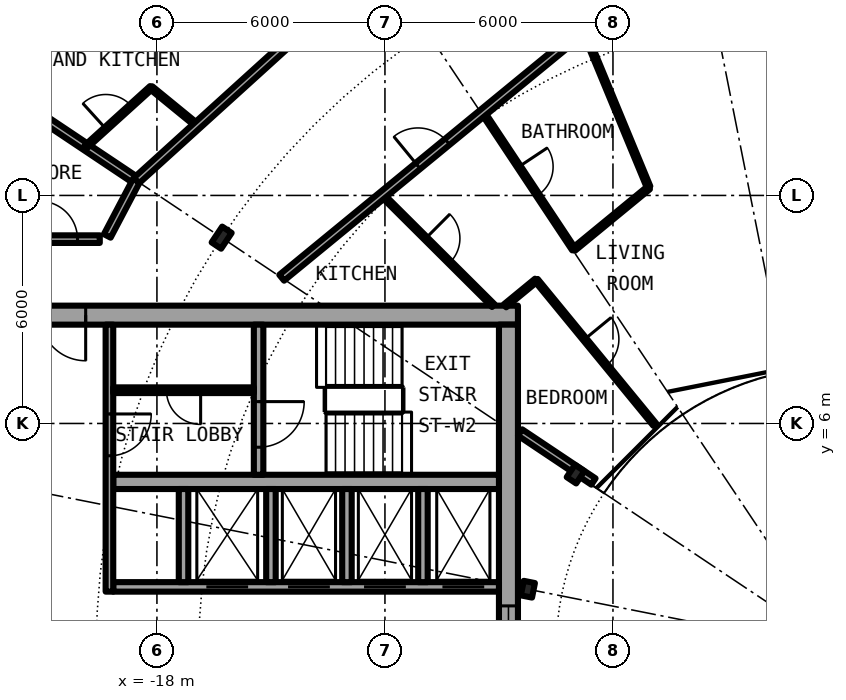
"""IFC4 building model, lengths in metres.
Left out: names, types, materials, properties, quantities, classifications, styles, units other than length and angle.
Written with IfcOpenShell. Run it as: python <this file> out.ifc"""

import sys

from ifc_helpers import new_model, si_unit, direction, frame, frame_2d, origin, origin_2d, place, context, subcontext, project, spatial, rectangle, i_section, extrude, element, fill, save


model = new_model("IFC4")
c1 = context("Model", 3, precision=1e-05, world=origin(), true_north=direction((0.0, 1.0)))
c2 = subcontext(c1, "Body", "Model", "MODEL_VIEW")
j1 = project(units=[si_unit("LENGTHUNIT", "METRE"), si_unit("PLANEANGLEUNIT", "RADIAN")], contexts=[c1])
p1 = place(None, origin())
s1 = spatial("IfcSite", under=j1, at=p1, CompositionType="ELEMENT")
p2 = place(p1, origin())
s2 = spatial("IfcBuilding", under=s1, at=p2, CompositionType="ELEMENT")
p3 = place(p2, frame((0.0, 0.0, 161.6)))
s3 = spatial("IfcBuildingStorey", under=s2, at=p3, CompositionType="ELEMENT", Elevation=161.6)
p4 = place(p3, frame((-16.297, 10.889, 0.0), z_axis=(0.0, 0.0, 1.0), x_axis=(-0.831469612303, 0.55557023302, 0.0)))
e1 = element("IfcColumn", 1, at=p4, inside=s3, PredefinedType="COLUMN", context=c2, shape_type="SweptSolid", body=[
    extrude(i_section(OverallWidth=0.3, OverallDepth=0.5, WebThickness=0.014, FlangeThickness=0.028, FilletRadius=0.027, at=origin_2d()), origin(), (0.0, 0.0, 1.0), 3.05),
])
for number, where, z_axis, x_axis in (
    (2, (-6.984, 4.667, 0.0), (0.0, 0.0, 1.0), (-0.831, 0.556, 0.0)),
    (3, (-8.239, 1.639, 0.0), (0.0, 0.0, 1.0), (-0.981, 0.195, 0.0)),
):
    element("IfcColumn", number, at=place(p3, frame(where, z_axis=z_axis, x_axis=x_axis)), inside=s3, PredefinedType="COLUMN", context=c2, shape_type="SweptSolid", body=[
        extrude(i_section(OverallWidth=0.3, OverallDepth=0.39, WebThickness=0.011, FlangeThickness=0.019, FilletRadius=0.027, at=origin_2d()), origin(), (0.0, 0.0, 1.0), 3.05),
    ])
p5 = place(p3, frame((-19.304, 19.304, 0.0), z_axis=(0.0, 0.0, 1.0), x_axis=(-0.634382322723, -0.773019449054, 0.0)))
e4 = element("IfcWall", 4, at=p5, inside=s3, PredefinedType="SOLIDWALL", context=c2, shape_type="SweptSolid", body=[
    extrude(rectangle(XDim=5.352, YDim=0.25, at=frame_2d((2.676, 0.0))), origin(), (0.0, 0.0, 1.0), 2.7),
])
p6 = place(p5, frame((0.441, 0.0, 0.3)))
e5 = element("IfcOpeningElement", 5, at=p6, cuts=e4, PredefinedType="OPENING", context=c2, shape_type="SweptSolid", body=[
    extrude(rectangle(XDim=1.8, YDim=2.1, at=frame_2d((0.9, 1.05))), frame((0.0, 0.135, 0.0), z_axis=(0.0, -1.0, 0.0), x_axis=(1.0, 0.0, 0.0)), (0.0, 0.0, 1.0), 0.27),
])
p7 = place(p5, frame((3.51, 0.0, 0.0)))
e6 = element("IfcOpeningElement", 6, at=p7, cuts=e4, PredefinedType="OPENING", context=c2, shape_type="SweptSolid", body=[
    extrude(rectangle(XDim=1.0, YDim=2.2, at=frame_2d((0.5, 1.1))), frame((0.0, 0.135, 0.0), z_axis=(0.0, -1.0, 0.0), x_axis=(1.0, 0.0, 0.0)), (0.0, 0.0, 1.0), 0.27),
])
p8 = place(p3, frame((-8.5, 8.85, 0.0), z_axis=(0.0, 0.0, 1.0), x_axis=(-1.0, 0.0, 0.0)))
e7 = element("IfcWall", 7, at=p8, inside=s3, PredefinedType="SHEAR", context=c2, shape_type="SweptSolid", body=[
    extrude(rectangle(XDim=13.6, YDim=0.5, at=frame_2d((6.8, 0.0))), origin(), (0.0, 0.0, 1.0), 3.05),
])
p9 = place(p8, frame((11.375, 0.0, 0.0)))
e8 = element("IfcOpeningElement", 8, at=p9, cuts=e7, PredefinedType="OPENING", context=c2, shape_type="SweptSolid", body=[
    extrude(rectangle(XDim=1.2, YDim=2.3, at=frame_2d((0.6, 1.15))), frame((0.0, 0.26, 0.0), z_axis=(0.0, -1.0, 0.0), x_axis=(1.0, 0.0, 0.0)), (0.0, 0.0, 1.0), 0.52),
])
p10 = place(p3, frame((-8.75, 8.6, 0.0), z_axis=(0.0, 0.0, 1.0), x_axis=(0.0, -1.0, 0.0)))
e9 = element("IfcWall", 9, at=p10, inside=s3, PredefinedType="SHEAR", context=c2, shape_type="SweptSolid", body=[
    extrude(rectangle(XDim=17.2, YDim=0.5, at=frame_2d((8.6, 0.0))), origin(), (0.0, 0.0, 1.0), 3.05),
])
p11 = place(p10, frame((7.4, 0.0, 0.1)))
e10 = element("IfcOpeningElement", 10, at=p11, cuts=e9, PredefinedType="OPENING", context=c2, shape_type="SweptSolid", body=[
    extrude(rectangle(XDim=2.4, YDim=2.2, at=frame_2d((1.2, 1.1))), frame((0.0, 0.26, 0.0), z_axis=(0.0, -1.0, 0.0), x_axis=(1.0, 0.0, 0.0)), (0.0, 0.0, 1.0), 0.52),
])
p12 = place(p3, frame((-9.0, 1.7, 0.0), z_axis=(0.0, 0.0, 1.0), x_axis=(-1.0, 0.0, 0.0)))
e11 = element("IfcWall", 11, at=p12, inside=s3, PredefinedType="SHEAR", context=c2, shape_type="SweptSolid", body=[
    extrude(rectangle(XDim=10.15, YDim=0.25, at=frame_2d((5.075, 0.0))), origin(), (0.0, 0.0, 1.0), 3.05),
])
p13 = place(p12, frame((0.387, 0.0, 0.0)))
e12 = element("IfcOpeningElement", 12, at=p13, cuts=e11, PredefinedType="OPENING", context=c2, shape_type="SweptSolid", body=[
    extrude(rectangle(XDim=1.1, YDim=2.3, at=frame_2d((0.55, 1.15))), frame((0.0, 0.135, 0.0), z_axis=(0.0, -1.0, 0.0), x_axis=(1.0, 0.0, 0.0)), (0.0, 0.0, 1.0), 0.27),
])
p14 = place(p12, frame((2.45, 0.0, 0.0)))
e13 = element("IfcOpeningElement", 13, at=p14, cuts=e11, PredefinedType="OPENING", context=c2, shape_type="SweptSolid", body=[
    extrude(rectangle(XDim=1.1, YDim=2.3, at=frame_2d((0.55, 1.15))), frame((0.0, 0.135, 0.0), z_axis=(0.0, -1.0, 0.0), x_axis=(1.0, 0.0, 0.0)), (0.0, 0.0, 1.0), 0.27),
])
p15 = place(p12, frame((4.45, 0.0, 0.0)))
e14 = element("IfcOpeningElement", 14, at=p15, cuts=e11, PredefinedType="OPENING", context=c2, shape_type="SweptSolid", body=[
    extrude(rectangle(XDim=1.1, YDim=2.3, at=frame_2d((0.55, 1.15))), frame((0.0, 0.135, 0.0), z_axis=(0.0, -1.0, 0.0), x_axis=(1.0, 0.0, 0.0)), (0.0, 0.0, 1.0), 0.27),
])
p16 = place(p12, frame((6.6, 0.0, 0.0)))
e15 = element("IfcOpeningElement", 15, at=p16, cuts=e11, PredefinedType="OPENING", context=c2, shape_type="SweptSolid", body=[
    extrude(rectangle(XDim=1.1, YDim=2.3, at=frame_2d((0.55, 1.15))), frame((0.0, 0.135, 0.0), z_axis=(0.0, -1.0, 0.0), x_axis=(1.0, 0.0, 0.0)), (0.0, 0.0, 1.0), 0.27),
])
p17 = place(p3, frame((-9.0, 4.462, 0.0), z_axis=(0.0, 0.0, 1.0), x_axis=(-1.0, 0.0, 0.0)))
e16 = element("IfcWall", 16, at=p17, inside=s3, PredefinedType="SHEAR", context=c2, shape_type="SweptSolid", body=[
    extrude(rectangle(XDim=10.15, YDim=0.375, at=frame_2d((5.075, 0.0))), origin(), (0.0, 0.0, 1.0), 3.05),
])
p18 = place(p3, frame((-15.325, 8.6, 0.0), z_axis=(0.0, 0.0, 1.0), x_axis=(0.0, -1.0, 0.0)))
e17 = element("IfcWall", 17, at=p18, inside=s3, PredefinedType="SHEAR", context=c2, shape_type="SweptSolid", body=[
    extrude(rectangle(XDim=3.95, YDim=0.25, at=frame_2d((1.975, 0.0))), origin(), (0.0, 0.0, 1.0), 3.05),
])
p19 = place(p18, frame((2.025, 0.0, 0.0)))
e18 = element("IfcOpeningElement", 18, at=p19, cuts=e17, PredefinedType="OPENING", context=c2, shape_type="SweptSolid", body=[
    extrude(rectangle(XDim=1.2, YDim=2.3, at=frame_2d((0.6, 1.15))), frame((0.0, 0.135, 0.0), z_axis=(0.0, -1.0, 0.0), x_axis=(1.0, 0.0, 0.0)), (0.0, 0.0, 1.0), 0.27),
])
for number, where, z_axis, x_axis in (
    (19, (-15.0, 1.825, 0.0), (0.0, 0.0, 1.0), (0.0, 1.0, 0.0)),
    (20, (-17.3, 1.825, 0.0), (0.0, 0.0, 1.0), (0.0, 1.0, 0.0)),
):
    element("IfcWall", number, at=place(p3, frame(where, z_axis=z_axis, x_axis=x_axis)), inside=s3, PredefinedType="SOLIDWALL", context=c2, shape_type="SweptSolid", body=[
        extrude(rectangle(XDim=2.45, YDim=0.25, at=frame_2d((1.225, 0.0))), origin(), (0.0, 0.0, 1.0), 2.7),
    ])
p20 = place(p3, frame((-19.25, 8.6, 0.0), z_axis=(0.0, 0.0, 1.0), x_axis=(0.0, -1.0, 0.0)))
e21 = element("IfcWall", 21, at=p20, inside=s3, PredefinedType="SOLIDWALL", context=c2, shape_type="SweptSolid", body=[
    extrude(rectangle(XDim=7.025, YDim=0.2, at=frame_2d((3.513, 0.0))), origin(), (0.0, 0.0, 1.0), 2.7),
])
p21 = place(p20, frame((2.35, 0.0, 0.0)))
e22 = element("IfcOpeningElement", 22, at=p21, cuts=e21, PredefinedType="OPENING", context=c2, shape_type="SweptSolid", body=[
    extrude(rectangle(XDim=1.1, YDim=2.3, at=frame_2d((0.55, 1.15))), frame((0.0, 0.11, 0.0), z_axis=(0.0, -1.0, 0.0), x_axis=(1.0, 0.0, 0.0)), (0.0, 0.0, 1.0), 0.22),
])
for number, where, z_axis, x_axis in (
    (23, (-11.0, 1.825, 0.0), (0.0, 0.0, 1.0), (0.0, 1.0, 0.0)),
    (24, (-13.0, 1.825, 0.0), (0.0, 0.0, 1.0), (0.0, 1.0, 0.0)),
):
    element("IfcWall", number, at=place(p3, frame(where, z_axis=z_axis, x_axis=x_axis)), inside=s3, PredefinedType="SOLIDWALL", context=c2, shape_type="SweptSolid", body=[
        extrude(rectangle(XDim=2.45, YDim=0.25, at=frame_2d((1.225, 0.0))), origin(), (0.0, 0.0, 1.0), 2.7),
    ])
p22 = place(p3, frame((-15.45, 6.875, 0.0), z_axis=(0.0, 0.0, 1.0), x_axis=(-1.0, 0.0, 0.0)))
e25 = element("IfcWall", 25, at=p22, inside=s3, PredefinedType="PARTITIONING", context=c2, shape_type="SweptSolid", body=[
    extrude(rectangle(XDim=3.7, YDim=0.15, at=frame_2d((1.85, 0.0))), origin(), (0.0, 0.0, 1.0), 2.7),
])
p23 = place(p22, frame((1.4, 0.0, 0.0)))
e26 = element("IfcOpeningElement", 26, at=p23, cuts=e25, PredefinedType="OPENING", context=c2, shape_type="SweptSolid", body=[
    extrude(rectangle(XDim=0.9, YDim=2.3, at=frame_2d((0.45, 1.15))), frame((0.0, 0.085, 0.0), z_axis=(0.0, -1.0, 0.0), x_axis=(1.0, 0.0, 0.0)), (0.0, 0.0, 1.0), 0.17),
])
p24 = place(p3, frame((-22.595, 15.098, 0.0), z_axis=(0.0, 0.0, 1.0), x_axis=(0.831387096605, -0.55569370664, 0.0)))
e27 = element("IfcWall", 27, at=p24, inside=s3, PredefinedType="PARTITIONING", context=c2, shape_type="SweptSolid", body=[
    extrude(rectangle(XDim=4.875, YDim=0.2, at=frame_2d((2.438, 0.0))), origin(), (0.0, 0.0, 1.0), 2.7),
])
p25 = place(p3, frame((-18.154, 14.834, 0.0), z_axis=(0.0, 0.0, 1.0), x_axis=(0.774345345452, -0.632763214779, 0.0)))
e28 = element("IfcWall", 28, at=p25, inside=s3, PredefinedType="PARTITIONING", context=c2, shape_type="SweptSolid", body=[
    extrude(rectangle(XDim=1.569, YDim=0.1, at=frame_2d((0.785, 0.0))), origin(), (0.0, 0.0, 1.0), 2.7),
])
p26 = place(p3, frame((-12.069, 12.007, 0.0), z_axis=(0.0, 0.0, 1.0), x_axis=(0.708822693149, -0.705386695138, 0.0)))
e29 = element("IfcWall", 29, at=p26, inside=s3, PredefinedType="PARTITIONING", context=c2, shape_type="SweptSolid", body=[
    extrude(rectangle(XDim=4.121, YDim=0.1, at=frame_2d((2.061, 0.0))), origin(), (0.0, 0.0, 1.0), 2.7),
])
p27 = place(p26, frame((1.611, 0.0, 0.0)))
e30 = element("IfcOpeningElement", 30, at=p27, cuts=e29, PredefinedType="OPENING", context=c2, shape_type="SweptSolid", body=[
    extrude(rectangle(XDim=0.9, YDim=2.3, at=frame_2d((0.45, 1.15))), frame((0.0, 0.06, 0.0), z_axis=(0.0, -1.0, 0.0), x_axis=(1.0, 0.0, 0.0)), (0.0, 0.0, 1.0), 0.12),
])
p28 = place(p3, frame((-9.421, 14.18, 0.0), z_axis=(0.0, 0.0, 1.0), x_axis=(0.553303732327, -0.832979579457, 0.0)))
e31 = element("IfcWall", 31, at=p28, inside=s3, PredefinedType="PARTITIONING", context=c2, shape_type="SweptSolid", body=[
    extrude(rectangle(XDim=4.319, YDim=0.1, at=frame_2d((2.16, 0.0))), origin(), (0.0, 0.0, 1.0), 2.7),
])
p29 = place(p28, frame((1.71, 0.0, 0.0)))
e32 = element("IfcOpeningElement", 32, at=p29, cuts=e31, PredefinedType="OPENING", context=c2, shape_type="SweptSolid", body=[
    extrude(rectangle(XDim=0.9, YDim=2.3, at=frame_2d((0.45, 1.15))), frame((0.0, 0.06, 0.0), z_axis=(0.0, -1.0, 0.0), x_axis=(1.0, 0.0, 0.0)), (0.0, 0.0, 1.0), 0.12),
])
p30 = place(p3, frame((-8.019, 9.771, 0.0), z_axis=(0.0, 0.0, 1.0), x_axis=(0.634401778971, -0.773003481776, 0.0)))
e33 = element("IfcWall", 33, at=p30, inside=s3, PredefinedType="PARTITIONING", context=c2, shape_type="SweptSolid", body=[
    extrude(rectangle(XDim=4.92, YDim=0.1, at=frame_2d((2.46, 0.0))), origin(), (0.0, 0.0, 1.0), 2.7),
])
p31 = place(p30, frame((2.01, 0.0, 0.0)))
e34 = element("IfcOpeningElement", 34, at=p31, cuts=e33, PredefinedType="OPENING", context=c2, shape_type="SweptSolid", body=[
    extrude(rectangle(XDim=0.9, YDim=2.3, at=frame_2d((0.45, 1.15))), frame((0.0, 0.06, 0.0), z_axis=(0.0, -1.0, 0.0), x_axis=(1.0, 0.0, 0.0)), (0.0, 0.0, 1.0), 0.12),
])
p32 = place(p3, frame((-6.513, 4.472, 0.0), z_axis=(0.0, 0.0, 1.0), x_axis=(-0.83133816625, 0.555766905579, 0.0)))
e35 = element("IfcWall", 35, at=p32, inside=s3, PredefinedType="PARTITIONING", context=c2, shape_type="SweptSolid", body=[
    extrude(rectangle(XDim=2.323, YDim=0.2, at=frame_2d((1.162, 0.0))), origin(), (0.0, 0.0, 1.0), 2.7),
])
p33 = place(p3, frame((-21.675, 10.85, 0.0), z_axis=(0.0, 0.0, 1.0), x_axis=(1.0, 0.0, 0.0)))
e36 = element("IfcWall", 36, at=p33, inside=s3, PredefinedType="PARTITIONING", context=c2, shape_type="SweptSolid", body=[
    extrude(rectangle(XDim=2.171, YDim=0.2, at=frame_2d((1.085, 0.0))), origin(), (0.0, 0.0, 1.0), 2.7),
])
p34 = place(p33, frame((0.585, 0.0, 0.0)))
e37 = element("IfcOpeningElement", 37, at=p34, cuts=e36, PredefinedType="OPENING", context=c2, shape_type="SweptSolid", body=[
    extrude(rectangle(XDim=1.0, YDim=2.3, at=frame_2d((0.5, 1.15))), frame((0.0, 0.11, 0.0), z_axis=(0.0, -1.0, 0.0), x_axis=(1.0, 0.0, 0.0)), (0.0, 0.0, 1.0), 0.22),
])
p35 = place(p3, frame((-8.842, 9.095, 0.0), z_axis=(0.0, 0.0, 1.0), x_axis=(0.772730269942, 0.634734534995, 0.0)))
e38 = element("IfcWall", 38, at=p35, inside=s3, PredefinedType="PARTITIONING", context=c2, shape_type="SweptSolid", body=[
    extrude(rectangle(XDim=1.065, YDim=0.1, at=frame_2d((0.532, 0.0))), origin(), (0.0, 0.0, 1.0), 2.7),
])
p36 = place(p3, frame((-7.034, 10.58, 0.0), z_axis=(0.0, 0.0, 1.0), x_axis=(0.772764723682, 0.634692588449, 0.0)))
e39 = element("IfcWall", 39, at=p36, inside=s3, PredefinedType="PARTITIONING", context=c2, shape_type="SweptSolid", body=[
    extrude(rectangle(XDim=2.557, YDim=0.1, at=frame_2d((1.278, 0.0))), origin(), (0.0, 0.0, 1.0), 2.7),
])
p37 = place(p3, frame((-14.717, 9.834, 0.0), z_axis=(0.0, 0.0, 1.0), x_axis=(0.773034536097, 0.634363938131, 0.0)))
e40 = element("IfcWall", 40, at=p37, inside=s3, PredefinedType="PARTITIONING", context=c2, shape_type="SweptSolid", body=[
    extrude(rectangle(XDim=10.277, YDim=0.2, at=frame_2d((5.138, 0.0))), origin(), (0.0, 0.0, 1.0), 2.7),
])
p38 = place(p37, frame((4.638, 0.0, 0.0)))
e41 = element("IfcOpeningElement", 41, at=p38, cuts=e40, PredefinedType="OPENING", context=c2, shape_type="SweptSolid", body=[
    extrude(rectangle(XDim=1.0, YDim=2.3, at=frame_2d((0.5, 1.15))), frame((0.0, 0.11, 0.0), z_axis=(0.0, -1.0, 0.0), x_axis=(1.0, 0.0, 0.0)), (0.0, 0.0, 1.0), 0.22),
])
p39 = place(p3, frame((-18.542, 12.389, 0.0), z_axis=(0.0, 0.0, 1.0), x_axis=(0.740947367223, 0.671563101283, 0.0)))
e42 = element("IfcWall", 42, at=p39, inside=s3, PredefinedType="PARTITIONING", context=c2, shape_type="SweptSolid", body=[
    extrude(rectangle(XDim=10.837, YDim=0.2, at=frame_2d((5.419, 0.0))), origin(), (0.0, 0.0, 1.0), 2.7),
])
p40 = place(p39, frame((6.002, 0.0, 0.0)))
e43 = element("IfcOpeningElement", 43, at=p40, cuts=e42, PredefinedType="OPENING", context=c2, shape_type="SweptSolid", body=[
    extrude(rectangle(XDim=1.0, YDim=2.3, at=frame_2d((0.5, 1.15))), frame((0.0, 0.11, 0.0), z_axis=(0.0, -1.0, 0.0), x_axis=(1.0, 0.0, 0.0)), (0.0, 0.0, 1.0), 0.22),
])
p41 = place(p3, frame((-19.307, 10.935, 0.0), z_axis=(0.0, 0.0, 1.0), x_axis=(0.465605550524, 0.884992356646, 0.0)))
e44 = element("IfcWall", 44, at=p41, inside=s3, PredefinedType="PARTITIONING", context=c2, shape_type="SweptSolid", body=[
    extrude(rectangle(XDim=1.643, YDim=0.2, at=frame_2d((0.821, 0.0))), origin(), (0.0, 0.0, 1.0), 2.7),
])
p42 = place(p3, frame((-19.871, 13.28, 0.0), z_axis=(0.0, 0.0, 1.0), x_axis=(0.741127434804, 0.671364376014, 0.0)))
e45 = element("IfcWall", 45, at=p42, inside=s3, PredefinedType="PARTITIONING", context=c2, shape_type="SweptSolid", body=[
    extrude(rectangle(XDim=2.324, YDim=0.1, at=frame_2d((1.162, 0.0))), origin(), (0.0, 0.0, 1.0), 2.7),
])
p43 = place(p42, frame((0.709, 0.0, 0.0)))
e46 = element("IfcOpeningElement", 46, at=p43, cuts=e45, PredefinedType="OPENING", context=c2, shape_type="SweptSolid", body=[
    extrude(rectangle(XDim=0.9, YDim=2.3, at=frame_2d((0.45, 1.15))), frame((0.0, 0.06, 0.0), z_axis=(0.0, -1.0, 0.0), x_axis=(1.0, 0.0, 0.0)), (0.0, 0.0, 1.0), 0.12),
])
p44 = place(p3, frame((-6.765, 16.334, 0.0), z_axis=(0.0, 0.0, 1.0), x_axis=(0.382498794932, -0.923955990226, 0.0)))
e47 = element("IfcWall", 47, at=p44, inside=s3, PredefinedType="PARTITIONING", context=c2, shape_type="SweptSolid", body=[
    extrude(rectangle(XDim=4.449, YDim=0.1, at=frame_2d((2.225, 0.0))), origin(), (0.0, 0.0, 1.0), 2.7),
])
p45 = place(p13, origin())
e48 = element("IfcDoor", 48, at=p45, inside=s3, OperationType="DOUBLE_DOOR_SLIDING", PredefinedType="DOOR", context=c2, shape_type="SweptSolid", body=[
    extrude(rectangle(XDim=1.1, YDim=2.3, at=frame_2d((0.55, 1.15))), frame((0.0, 0.025, 0.0), z_axis=(0.0, -1.0, 0.0), x_axis=(1.0, 0.0, 0.0)), (0.0, 0.0, 1.0), 0.05),
])
fill(e12, e48)
p46 = place(p14, origin())
e49 = element("IfcDoor", 49, at=p46, inside=s3, OperationType="DOUBLE_DOOR_SLIDING", PredefinedType="DOOR", context=c2, shape_type="SweptSolid", body=[
    extrude(rectangle(XDim=1.1, YDim=2.3, at=frame_2d((0.55, 1.15))), frame((0.0, 0.025, 0.0), z_axis=(0.0, -1.0, 0.0), x_axis=(1.0, 0.0, 0.0)), (0.0, 0.0, 1.0), 0.05),
])
fill(e13, e49)
p47 = place(p15, origin())
e50 = element("IfcDoor", 50, at=p47, inside=s3, OperationType="DOUBLE_DOOR_SLIDING", PredefinedType="DOOR", context=c2, shape_type="SweptSolid", body=[
    extrude(rectangle(XDim=1.1, YDim=2.3, at=frame_2d((0.55, 1.15))), frame((0.0, 0.025, 0.0), z_axis=(0.0, -1.0, 0.0), x_axis=(1.0, 0.0, 0.0)), (0.0, 0.0, 1.0), 0.05),
])
fill(e14, e50)
p48 = place(p16, origin())
e51 = element("IfcDoor", 51, at=p48, inside=s3, OperationType="DOUBLE_DOOR_SLIDING", PredefinedType="DOOR", context=c2, shape_type="SweptSolid", body=[
    extrude(rectangle(XDim=1.1, YDim=2.3, at=frame_2d((0.55, 1.15))), frame((0.0, 0.025, 0.0), z_axis=(0.0, -1.0, 0.0), x_axis=(1.0, 0.0, 0.0)), (0.0, 0.0, 1.0), 0.05),
])
fill(e15, e51)
p49 = place(p23, origin())
e52 = element("IfcDoor", 52, at=p49, inside=s3, OperationType="SINGLE_SWING_LEFT", PredefinedType="DOOR", context=c2, shape_type="SweptSolid", body=[
    extrude(rectangle(XDim=0.9, YDim=2.3, at=frame_2d((0.45, 1.15))), frame((0.0, 0.025, 0.0), z_axis=(0.0, -1.0, 0.0), x_axis=(1.0, 0.0, 0.0)), (0.0, 0.0, 1.0), 0.05),
])
fill(e26, e52)
p50 = place(p19, origin())
e53 = element("IfcDoor", 53, at=p50, inside=s3, OperationType="SINGLE_SWING_LEFT", PredefinedType="DOOR", context=c2, shape_type="SweptSolid", body=[
    extrude(rectangle(XDim=1.2, YDim=2.3, at=frame_2d((0.6, 1.15))), frame((0.0, 0.025, 0.0), z_axis=(0.0, -1.0, 0.0), x_axis=(1.0, 0.0, 0.0)), (0.0, 0.0, 1.0), 0.05),
])
fill(e18, e53)
p51 = place(p21, origin())
e54 = element("IfcDoor", 54, at=p51, inside=s3, OperationType="SINGLE_SWING_RIGHT", PredefinedType="DOOR", context=c2, shape_type="SweptSolid", body=[
    extrude(rectangle(XDim=1.1, YDim=2.3, at=frame_2d((0.55, 1.15))), frame((0.0, 0.025, 0.0), z_axis=(0.0, -1.0, 0.0), x_axis=(1.0, 0.0, 0.0)), (0.0, 0.0, 1.0), 0.05),
])
fill(e22, e54)
p52 = place(p9, origin())
e55 = element("IfcDoor", 55, at=p52, inside=s3, OperationType="SINGLE_SWING_LEFT", PredefinedType="DOOR", context=c2, shape_type="SweptSolid", body=[
    extrude(rectangle(XDim=1.2, YDim=2.3, at=frame_2d((0.6, 1.15))), frame((0.0, 0.025, 0.0), z_axis=(0.0, -1.0, 0.0), x_axis=(1.0, 0.0, 0.0)), (0.0, 0.0, 1.0), 0.05),
])
fill(e8, e55)
p53 = place(p11, origin())
e56 = element("IfcWindow", 56, at=p53, inside=s3, PartitioningType="SINGLE_PANEL", PredefinedType="WINDOW", context=c2, shape_type="SweptSolid", body=[
    extrude(rectangle(XDim=2.4, YDim=2.2, at=frame_2d((1.2, 1.1))), frame((0.0, 0.03, 0.0), z_axis=(0.0, -1.0, 0.0), x_axis=(1.0, 0.0, 0.0)), (0.0, 0.0, 1.0), 0.06),
])
fill(e10, e56)
p54 = place(p43, origin())
e57 = element("IfcDoor", 57, at=p54, inside=s3, OperationType="SINGLE_SWING_LEFT", PredefinedType="DOOR", context=c2, shape_type="SweptSolid", body=[
    extrude(rectangle(XDim=0.9, YDim=2.3, at=frame_2d((0.45, 1.15))), frame((0.0, 0.025, 0.0), z_axis=(0.0, -1.0, 0.0), x_axis=(1.0, 0.0, 0.0)), (0.0, 0.0, 1.0), 0.05),
])
fill(e46, e57)
p55 = place(p38, origin())
e58 = element("IfcDoor", 58, at=p55, inside=s3, OperationType="SINGLE_SWING_LEFT", PredefinedType="DOOR", context=c2, shape_type="SweptSolid", body=[
    extrude(rectangle(XDim=1.0, YDim=2.3, at=frame_2d((0.5, 1.15))), frame((0.0, 0.025, 0.0), z_axis=(0.0, -1.0, 0.0), x_axis=(1.0, 0.0, 0.0)), (0.0, 0.0, 1.0), 0.05),
])
fill(e41, e58)
p56 = place(p29, origin())
e59 = element("IfcDoor", 59, at=p56, inside=s3, OperationType="SINGLE_SWING_RIGHT", PredefinedType="DOOR", context=c2, shape_type="SweptSolid", body=[
    extrude(rectangle(XDim=0.9, YDim=2.3, at=frame_2d((0.45, 1.15))), frame((0.0, 0.025, 0.0), z_axis=(0.0, -1.0, 0.0), x_axis=(1.0, 0.0, 0.0)), (0.0, 0.0, 1.0), 0.05),
])
fill(e32, e59)
p57 = place(p27, origin())
e60 = element("IfcDoor", 60, at=p57, inside=s3, OperationType="SINGLE_SWING_RIGHT", PredefinedType="DOOR", context=c2, shape_type="SweptSolid", body=[
    extrude(rectangle(XDim=0.9, YDim=2.3, at=frame_2d((0.45, 1.15))), frame((0.0, 0.025, 0.0), z_axis=(0.0, -1.0, 0.0), x_axis=(1.0, 0.0, 0.0)), (0.0, 0.0, 1.0), 0.05),
])
fill(e30, e60)
p58 = place(p31, origin())
e61 = element("IfcDoor", 61, at=p58, inside=s3, OperationType="SINGLE_SWING_RIGHT", PredefinedType="DOOR", context=c2, shape_type="SweptSolid", body=[
    extrude(rectangle(XDim=0.9, YDim=2.3, at=frame_2d((0.45, 1.15))), frame((0.0, 0.025, 0.0), z_axis=(0.0, -1.0, 0.0), x_axis=(1.0, 0.0, 0.0)), (0.0, 0.0, 1.0), 0.05),
])
fill(e34, e61)
p59 = place(p34, origin())
e62 = element("IfcDoor", 62, at=p59, inside=s3, OperationType="SINGLE_SWING_LEFT", PredefinedType="DOOR", context=c2, shape_type="SweptSolid", body=[
    extrude(rectangle(XDim=1.0, YDim=2.3, at=frame_2d((0.5, 1.15))), frame((0.0, 0.025, 0.0), z_axis=(0.0, -1.0, 0.0), x_axis=(1.0, 0.0, 0.0)), (0.0, 0.0, 1.0), 0.05),
])
fill(e37, e62)
save(model, sys.argv[1])
